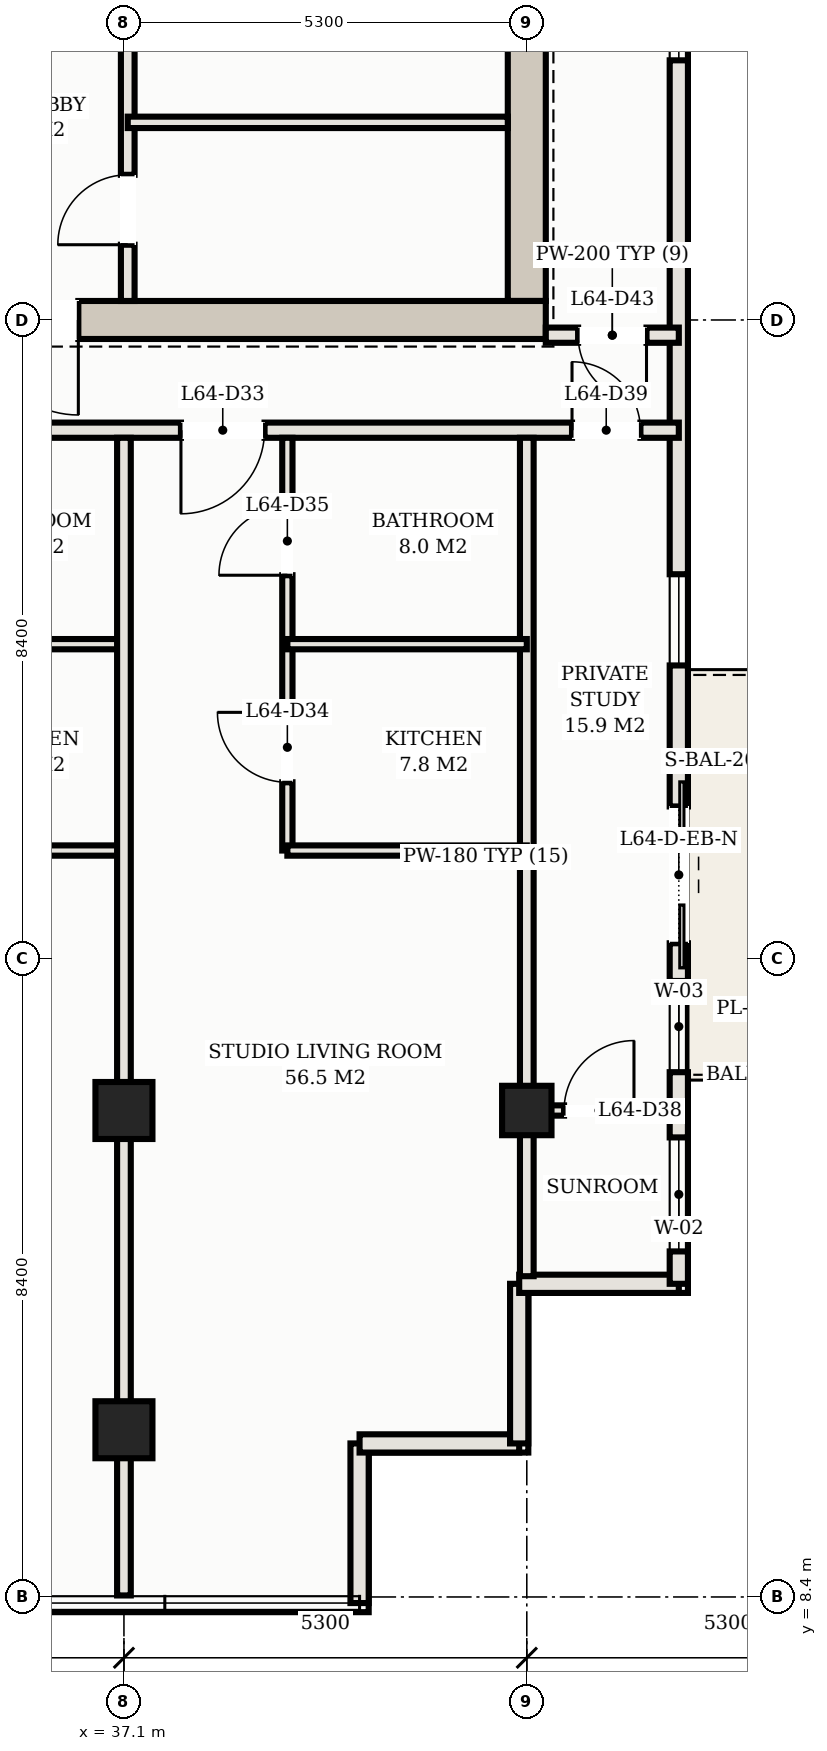
"""IFC4 building model, lengths in metres.
Left out: names, types, materials, properties, quantities, classifications, styles, units other than length and angle.
Written with IfcOpenShell. Run it as: python <this file> out.ifc"""

import sys

from ifc_helpers import new_model, si_unit, direction, frame, frame_2d, origin, origin_2d, place, context, subcontext, project, spatial, rectangle, hollow_rectangle, extrude, element, fill, save


model = new_model("IFC4")
c1 = context("Model", 3, precision=1e-05, world=origin(), true_north=direction((0.0, 1.0)))
c2 = subcontext(c1, "Body", "Model", "MODEL_VIEW")
j1 = project(units=[si_unit("LENGTHUNIT", "METRE"), si_unit("PLANEANGLEUNIT", "RADIAN")], contexts=[c1])
p1 = place(None, origin())
s1 = spatial("IfcSite", under=j1, at=p1, CompositionType="ELEMENT")
p2 = place(p1, origin())
s2 = spatial("IfcBuilding", under=s1, at=p2, CompositionType="ELEMENT")
p3 = place(p2, frame((0.0, 0.0, 233.0)))
s3 = spatial("IfcBuildingStorey", under=s2, at=p3, CompositionType="ELEMENT", Elevation=233.0)
p4 = place(p3, frame((42.4, 25.45, 0.0), z_axis=(0.0, 0.0, 1.0), x_axis=(0.0, 1.0, 0.0)))
e1 = element("IfcWall", 1, at=p4, inside=s3, PredefinedType="SHEAR", context=c2, shape_type="SweptSolid", body=[
    extrude(rectangle(XDim=14.3, YDim=0.5, at=frame_2d((7.15, 0.0))), origin(), (0.0, 0.0, 1.0), 3.11),
])
p5 = place(p3, frame((34.6, 25.2, 0.0), z_axis=(0.0, 0.0, 1.0), x_axis=(1.0, 0.0, 0.0)))
e2 = element("IfcWall", 2, at=p5, inside=s3, PredefinedType="SHEAR", context=c2, shape_type="SweptSolid", body=[
    extrude(rectangle(XDim=8.05, YDim=0.5, at=frame_2d((4.025, 0.0))), origin(), (0.0, 0.0, 1.0), 3.11),
])
p6 = place(p5, frame((0.65, 0.0, 0.0)))
e3 = element("IfcOpeningElement", 3, at=p6, cuts=e2, PredefinedType="OPENING", context=c2, shape_type="SweptSolid", body=[
    extrude(rectangle(XDim=1.25, YDim=2.2, at=frame_2d((0.625, 1.1))), frame((0.0, 0.26, 0.0), z_axis=(0.0, -1.0, 0.0), x_axis=(1.0, 0.0, 0.0)), (0.0, 0.0, 1.0), 0.52),
])
for number, where, z_axis, x_axis in (
    (4, (37.1, 14.8, 0.0), (0.0, 0.0, 1.0), (1.0, 0.0, 0.0)),
    (5, (37.1, 10.6, 0.0), (0.0, 0.0, 1.0), (1.0, 0.0, 0.0)),
):
    element("IfcColumn", number, at=place(p3, frame(where, z_axis=z_axis, x_axis=x_axis)), inside=s3, PredefinedType="COLUMN", context=c2, shape_type="SweptSolid", body=[
        extrude(hollow_rectangle(XDim=0.75, YDim=0.75, WallThickness=0.025, at=origin_2d()), origin(), (0.0, 0.0, 1.0), 3.3),
    ])
p7 = place(p3, frame((42.4, 14.8, 0.0), z_axis=(0.0, 0.0, 1.0), x_axis=(1.0, 0.0, 0.0)))
e6 = element("IfcColumn", 6, at=p7, inside=s3, PredefinedType="COLUMN", context=c2, shape_type="SweptSolid", body=[
    extrude(hollow_rectangle(XDim=0.65, YDim=0.65, WallThickness=0.022, at=origin_2d()), origin(), (0.0, 0.0, 1.0), 3.3),
])
p8 = place(p3, frame((40.2, 8.32, 0.0), z_axis=(0.0, 0.0, 1.0), x_axis=(0.0, 1.0, 0.0)))
e7 = element("IfcWall", 7, at=p8, inside=s3, PredefinedType="SOLIDWALL", context=c2, shape_type="SweptSolid", body=[
    extrude(rectangle(XDim=2.1, YDim=0.24, at=frame_2d((1.05, 0.0))), origin(), (0.0, 0.0, 1.0), 3.11),
])
for number, where, z_axis, x_axis in (
    (8, (40.2, 10.42, 0.0), (0.0, 0.0, 1.0), (1.0, 0.0, 0.0)),
    (9, (42.3, 10.42, 0.0), (0.0, 0.0, 1.0), (0.0, 1.0, 0.0)),
):
    element("IfcWall", number, at=place(p3, frame(where, z_axis=z_axis, x_axis=x_axis)), inside=s3, PredefinedType="SOLIDWALL", context=c2, shape_type="SweptSolid", body=[
        extrude(rectangle(XDim=2.1, YDim=0.24, at=frame_2d((1.05, 0.0))), origin(), (0.0, 0.0, 1.0), 3.11),
    ])
p9 = place(p3, frame((42.3, 12.52, 0.0), z_axis=(0.0, 0.0, 1.0), x_axis=(1.0, 0.0, 0.0)))
e10 = element("IfcWall", 10, at=p9, inside=s3, PredefinedType="SOLIDWALL", context=c2, shape_type="SweptSolid", body=[
    extrude(rectangle(XDim=2.1, YDim=0.24, at=frame_2d((1.05, 0.0))), origin(), (0.0, 0.0, 1.0), 3.11),
])
p10 = place(p3, frame((44.4, 12.52, 0.0), z_axis=(0.0, 0.0, 1.0), x_axis=(0.0, 1.0, 0.0)))
e11 = element("IfcWall", 11, at=p10, inside=s3, PredefinedType="SOLIDWALL", context=c2, shape_type="SweptSolid", body=[
    extrude(rectangle(XDim=26.01, YDim=0.24, at=frame_2d((13.005, 0.0))), origin(), (0.0, 0.0, 1.0), 3.11),
])
p11 = place(p10, frame((4.48, 0.0, 0.0)))
e12 = element("IfcOpeningElement", 12, at=p11, cuts=e11, PredefinedType="OPENING", context=c2, shape_type="SweptSolid", body=[
    extrude(rectangle(XDim=1.8, YDim=2.2, at=frame_2d((0.9, 1.1))), frame((0.0, 0.13, 0.0), z_axis=(0.0, -1.0, 0.0), x_axis=(1.0, 0.0, 0.0)), (0.0, 0.0, 1.0), 0.26),
])
p12 = place(p10, frame((0.426, 0.0, 0.75)))
e13 = element("IfcOpeningElement", 13, at=p12, cuts=e11, PredefinedType="OPENING", context=c2, shape_type="SweptSolid", body=[
    extrude(rectangle(XDim=1.5, YDim=1.6, at=frame_2d((0.75, 0.8))), frame((0.0, 0.13, 0.0), z_axis=(0.0, -1.0, 0.0), x_axis=(1.0, 0.0, 0.0)), (0.0, 0.0, 1.0), 0.26),
])
p13 = place(p10, frame((2.784, 0.0, 0.75)))
e14 = element("IfcOpeningElement", 14, at=p13, cuts=e11, PredefinedType="OPENING", context=c2, shape_type="SweptSolid", body=[
    extrude(rectangle(XDim=1.2, YDim=1.5, at=frame_2d((0.6, 0.75))), frame((0.0, 0.13, 0.0), z_axis=(0.0, -1.0, 0.0), x_axis=(1.0, 0.0, 0.0)), (0.0, 0.0, 1.0), 0.26),
])
p14 = place(p10, frame((8.135, 0.0, 0.75)))
e15 = element("IfcOpeningElement", 15, at=p14, cuts=e11, PredefinedType="OPENING", context=c2, shape_type="SweptSolid", body=[
    extrude(rectangle(XDim=1.2, YDim=1.5, at=frame_2d((0.6, 0.75))), frame((0.0, 0.13, 0.0), z_axis=(0.0, -1.0, 0.0), x_axis=(1.0, 0.0, 0.0)), (0.0, 0.0, 1.0), 0.26),
])
p15 = place(p10, frame((16.096, 0.0, 0.75)))
e16 = element("IfcOpeningElement", 16, at=p15, cuts=e11, PredefinedType="OPENING", context=c2, shape_type="SweptSolid", body=[
    extrude(rectangle(XDim=1.2, YDim=1.5, at=frame_2d((0.6, 0.75))), frame((0.0, 0.13, 0.0), z_axis=(0.0, -1.0, 0.0), x_axis=(1.0, 0.0, 0.0)), (0.0, 0.0, 1.0), 0.26),
])
p16 = place(p10, frame((22.809, 0.0, 0.75)))
e17 = element("IfcOpeningElement", 17, at=p16, cuts=e11, PredefinedType="OPENING", context=c2, shape_type="SweptSolid", body=[
    extrude(rectangle(XDim=1.2, YDim=1.5, at=frame_2d((0.6, 0.75))), frame((0.0, 0.13, 0.0), z_axis=(0.0, -1.0, 0.0), x_axis=(1.0, 0.0, 0.0)), (0.0, 0.0, 1.0), 0.26),
])
p17 = place(p3, frame((37.15, 25.45, 0.0), z_axis=(0.0, 0.0, 1.0), x_axis=(0.0, 1.0, 0.0)))
e18 = element("IfcWall", 18, at=p17, inside=s3, PredefinedType="PARTITIONING", context=c2, shape_type="SweptSolid", body=[
    extrude(rectangle(XDim=5.475, YDim=0.18, at=frame_2d((2.738, 0.0))), origin(), (0.0, 0.0, 1.0), 2.45),
])
p18 = place(p17, frame((0.74, 0.0, 0.0)))
e19 = element("IfcOpeningElement", 19, at=p18, cuts=e18, PredefinedType="OPENING", context=c2, shape_type="SweptSolid", body=[
    extrude(rectangle(XDim=0.92, YDim=2.15, at=frame_2d((0.46, 1.075))), frame((0.0, 0.1, 0.0), z_axis=(0.0, -1.0, 0.0), x_axis=(1.0, 0.0, 0.0)), (0.0, 0.0, 1.0), 0.2),
])
p19 = place(p17, frame((3.427, 0.0, 0.0)))
e20 = element("IfcOpeningElement", 20, at=p19, cuts=e18, PredefinedType="OPENING", context=c2, shape_type="SweptSolid", body=[
    extrude(rectangle(XDim=0.92, YDim=2.15, at=frame_2d((0.46, 1.075))), frame((0.0, 0.1, 0.0), z_axis=(0.0, -1.0, 0.0), x_axis=(1.0, 0.0, 0.0)), (0.0, 0.0, 1.0), 0.2),
])
p20 = place(p3, frame((37.15, 27.8, 0.0), z_axis=(0.0, 0.0, 1.0), x_axis=(1.0, 0.0, 0.0)))
e21 = element("IfcWall", 21, at=p20, inside=s3, PredefinedType="PARTITIONING", context=c2, shape_type="SweptSolid", body=[
    extrude(rectangle(XDim=5.0, YDim=0.15, at=frame_2d((2.5, 0.0))), origin(), (0.0, 0.0, 1.0), 2.45),
])
p21 = place(p3, frame((8.6, 23.75, 0.0), z_axis=(0.0, 0.0, 1.0), x_axis=(1.0, 0.0, 0.0)))
e22 = element("IfcWall", 22, at=p21, inside=s3, PredefinedType="PARTITIONING", context=c2, shape_type="SweptSolid", body=[
    extrude(rectangle(XDim=35.8, YDim=0.2, at=frame_2d((17.9, 0.0))), origin(), (0.0, 0.0, 1.0), 2.45),
])
p22 = place(p21, frame((2.75, 0.0, 0.0)))
e23 = element("IfcOpeningElement", 23, at=p22, cuts=e22, PredefinedType="OPENING", context=c2, shape_type="SweptSolid", body=[
    extrude(rectangle(XDim=1.1, YDim=2.25, at=frame_2d((0.55, 1.125))), frame((0.0, 0.11, 0.0), z_axis=(0.0, -1.0, 0.0), x_axis=(1.0, 0.0, 0.0)), (0.0, 0.0, 1.0), 0.22),
])
p23 = place(p21, frame((8.05, 0.0, 0.0)))
e24 = element("IfcOpeningElement", 24, at=p23, cuts=e22, PredefinedType="OPENING", context=c2, shape_type="SweptSolid", body=[
    extrude(rectangle(XDim=1.1, YDim=2.25, at=frame_2d((0.55, 1.125))), frame((0.0, 0.11, 0.0), z_axis=(0.0, -1.0, 0.0), x_axis=(1.0, 0.0, 0.0)), (0.0, 0.0, 1.0), 0.22),
])
p24 = place(p21, frame((13.35, 0.0, 0.0)))
e25 = element("IfcOpeningElement", 25, at=p24, cuts=e22, PredefinedType="OPENING", context=c2, shape_type="SweptSolid", body=[
    extrude(rectangle(XDim=1.1, YDim=2.25, at=frame_2d((0.55, 1.125))), frame((0.0, 0.11, 0.0), z_axis=(0.0, -1.0, 0.0), x_axis=(1.0, 0.0, 0.0)), (0.0, 0.0, 1.0), 0.22),
])
p25 = place(p21, frame((18.85, 0.0, 0.0)))
e26 = element("IfcOpeningElement", 26, at=p25, cuts=e22, PredefinedType="OPENING", context=c2, shape_type="SweptSolid", body=[
    extrude(rectangle(XDim=1.1, YDim=2.25, at=frame_2d((0.55, 1.125))), frame((0.0, 0.11, 0.0), z_axis=(0.0, -1.0, 0.0), x_axis=(1.0, 0.0, 0.0)), (0.0, 0.0, 1.0), 0.22),
])
p26 = place(p21, frame((23.95, 0.0, 0.0)))
e27 = element("IfcOpeningElement", 27, at=p26, cuts=e22, PredefinedType="OPENING", context=c2, shape_type="SweptSolid", body=[
    extrude(rectangle(XDim=1.1, YDim=2.25, at=frame_2d((0.55, 1.125))), frame((0.0, 0.11, 0.0), z_axis=(0.0, -1.0, 0.0), x_axis=(1.0, 0.0, 0.0)), (0.0, 0.0, 1.0), 0.22),
])
p27 = place(p21, frame((29.25, 0.0, 0.0)))
e28 = element("IfcOpeningElement", 28, at=p27, cuts=e22, PredefinedType="OPENING", context=c2, shape_type="SweptSolid", body=[
    extrude(rectangle(XDim=1.1, YDim=2.25, at=frame_2d((0.55, 1.125))), frame((0.0, 0.11, 0.0), z_axis=(0.0, -1.0, 0.0), x_axis=(1.0, 0.0, 0.0)), (0.0, 0.0, 1.0), 0.22),
])
p28 = place(p21, frame((0.505, 0.0, 0.0)))
e29 = element("IfcOpeningElement", 29, at=p28, cuts=e22, PredefinedType="OPENING", context=c2, shape_type="SweptSolid", body=[
    extrude(rectangle(XDim=0.9, YDim=2.15, at=frame_2d((0.45, 1.075))), frame((0.0, 0.11, 0.0), z_axis=(0.0, -1.0, 0.0), x_axis=(1.0, 0.0, 0.0)), (0.0, 0.0, 1.0), 0.22),
])
p29 = place(p21, frame((34.395, 0.0, 0.0)))
e30 = element("IfcOpeningElement", 30, at=p29, cuts=e22, PredefinedType="OPENING", context=c2, shape_type="SweptSolid", body=[
    extrude(rectangle(XDim=0.9, YDim=2.15, at=frame_2d((0.45, 1.075))), frame((0.0, 0.11, 0.0), z_axis=(0.0, -1.0, 0.0), x_axis=(1.0, 0.0, 0.0)), (0.0, 0.0, 1.0), 0.22),
])
p30 = place(p3, frame((42.65, 25.0, 0.0), z_axis=(0.0, 0.0, 1.0), x_axis=(1.0, 0.0, 0.0)))
e31 = element("IfcWall", 31, at=p30, inside=s3, PredefinedType="PARTITIONING", context=c2, shape_type="SweptSolid", body=[
    extrude(rectangle(XDim=1.75, YDim=0.2, at=frame_2d((0.875, 0.0))), origin(), (0.0, 0.0, 1.0), 2.45),
])
p31 = place(p30, frame((0.425, 0.0, 0.0)))
e32 = element("IfcOpeningElement", 32, at=p31, cuts=e31, PredefinedType="OPENING", context=c2, shape_type="SweptSolid", body=[
    extrude(rectangle(XDim=0.9, YDim=2.15, at=frame_2d((0.45, 1.075))), frame((0.0, 0.11, 0.0), z_axis=(0.0, -1.0, 0.0), x_axis=(1.0, 0.0, 0.0)), (0.0, 0.0, 1.0), 0.22),
])
p32 = place(p3, frame((42.4, 12.62, 0.0), z_axis=(0.0, 0.0, 1.0), x_axis=(0.0, 1.0, 0.0)))
e33 = element("IfcWall", 33, at=p32, inside=s3, PredefinedType="PARTITIONING", context=c2, shape_type="SweptSolid", body=[
    extrude(rectangle(XDim=11.03, YDim=0.18, at=frame_2d((5.515, 0.0))), origin(), (0.0, 0.0, 1.0), 2.45),
])
for number, where, z_axis, x_axis in (
    (34, (33.95, 18.22, 0.0), (0.0, 0.0, 1.0), (1.0, 0.0, 0.0)),
    (35, (33.95, 20.935, 0.0), (0.0, 0.0, 1.0), (1.0, 0.0, 0.0)),
):
    element("IfcWall", number, at=place(p3, frame(where, z_axis=z_axis, x_axis=x_axis)), inside=s3, PredefinedType="PARTITIONING", context=c2, shape_type="SweptSolid", body=[
        extrude(rectangle(XDim=3.15, YDim=0.135, at=frame_2d((1.575, 0.0))), origin(), (0.0, 0.0, 1.0), 2.45),
    ])
p33 = place(p3, frame((37.1, 8.42, 0.0), z_axis=(0.0, 0.0, 1.0), x_axis=(0.0, 1.0, 0.0)))
e36 = element("IfcWall", 36, at=p33, inside=s3, PredefinedType="PARTITIONING", context=c2, shape_type="SweptSolid", body=[
    extrude(rectangle(XDim=15.23, YDim=0.18, at=frame_2d((7.615, 0.0))), origin(), (0.0, 0.0, 1.0), 2.45),
])
p34 = place(p3, frame((39.25, 18.22, 0.0), z_axis=(0.0, 0.0, 1.0), x_axis=(0.0, 1.0, 0.0)))
e37 = element("IfcWall", 37, at=p34, inside=s3, PredefinedType="PARTITIONING", context=c2, shape_type="SweptSolid", body=[
    extrude(rectangle(XDim=5.43, YDim=0.135, at=frame_2d((2.715, 0.0))), origin(), (0.0, 0.0, 1.0), 2.45),
])
p35 = place(p34, frame((0.898, 0.0, 0.0)))
e38 = element("IfcOpeningElement", 38, at=p35, cuts=e37, PredefinedType="OPENING", context=c2, shape_type="SweptSolid", body=[
    extrude(rectangle(XDim=0.92, YDim=2.15, at=frame_2d((0.46, 1.075))), frame((0.0, 0.078, 0.0), z_axis=(0.0, -1.0, 0.0), x_axis=(1.0, 0.0, 0.0)), (0.0, 0.0, 1.0), 0.155),
])
p36 = place(p34, frame((3.622, 0.0, 0.0)))
e39 = element("IfcOpeningElement", 39, at=p36, cuts=e37, PredefinedType="OPENING", context=c2, shape_type="SweptSolid", body=[
    extrude(rectangle(XDim=0.9, YDim=2.15, at=frame_2d((0.45, 1.075))), frame((0.0, 0.078, 0.0), z_axis=(0.0, -1.0, 0.0), x_axis=(1.0, 0.0, 0.0)), (0.0, 0.0, 1.0), 0.155),
])
for number, where, z_axis, x_axis in (
    (40, (39.25, 18.22, 0.0), (0.0, 0.0, 1.0), (1.0, 0.0, 0.0)),
    (41, (39.25, 20.935, 0.0), (0.0, 0.0, 1.0), (1.0, 0.0, 0.0)),
):
    element("IfcWall", number, at=place(p3, frame(where, z_axis=z_axis, x_axis=x_axis)), inside=s3, PredefinedType="PARTITIONING", context=c2, shape_type="SweptSolid", body=[
        extrude(rectangle(XDim=3.15, YDim=0.135, at=frame_2d((1.575, 0.0))), origin(), (0.0, 0.0, 1.0), 2.45),
    ])
p37 = place(p3, frame((42.4, 14.8, 0.0), z_axis=(0.0, 0.0, 1.0), x_axis=(1.0, 0.0, 0.0)))
e42 = element("IfcWall", 42, at=p37, inside=s3, PredefinedType="PARTITIONING", context=c2, shape_type="SweptSolid", body=[
    extrude(rectangle(XDim=1.9, YDim=0.135, at=frame_2d((0.95, 0.0))), origin(), (0.0, 0.0, 1.0), 2.45),
])
p38 = place(p37, frame((0.49, 0.0, 0.0)))
e43 = element("IfcOpeningElement", 43, at=p38, cuts=e42, PredefinedType="OPENING", context=c2, shape_type="SweptSolid", body=[
    extrude(rectangle(XDim=0.92, YDim=2.15, at=frame_2d((0.46, 1.075))), frame((0.0, 0.078, 0.0), z_axis=(0.0, -1.0, 0.0), x_axis=(1.0, 0.0, 0.0)), (0.0, 0.0, 1.0), 0.155),
])
p39 = place(p11, frame((1.8, 0.0, 0.0), z_axis=(0.0, 0.0, 1.0), x_axis=(-1.0, 0.0, 0.0)))
e44 = element("IfcDoor", 44, at=p39, inside=s3, OperationType="DOUBLE_DOOR_SLIDING", PredefinedType="DOOR", context=c2, shape_type="SweptSolid", body=[
    extrude(rectangle(XDim=1.8, YDim=2.2, at=frame_2d((0.9, 1.1))), frame((0.0, 0.025, 0.0), z_axis=(0.0, -1.0, 0.0), x_axis=(1.0, 0.0, 0.0)), (0.0, 0.0, 1.0), 0.05),
])
fill(e12, e44)
p40 = place(p12, origin())
e45 = element("IfcWindow", 45, at=p40, inside=s3, PartitioningType="SINGLE_PANEL", PredefinedType="WINDOW", context=c2, shape_type="SweptSolid", body=[
    extrude(rectangle(XDim=1.5, YDim=1.6, at=frame_2d((0.75, 0.8))), frame((0.0, 0.03, 0.0), z_axis=(0.0, -1.0, 0.0), x_axis=(1.0, 0.0, 0.0)), (0.0, 0.0, 1.0), 0.06),
])
fill(e13, e45)
p41 = place(p6, frame((1.25, 0.0, 0.0), z_axis=(0.0, 0.0, 1.0), x_axis=(-1.0, 0.0, 0.0)))
e46 = element("IfcDoor", 46, at=p41, inside=s3, OperationType="SINGLE_SWING_LEFT", PredefinedType="DOOR", context=c2, shape_type="SweptSolid", body=[
    extrude(rectangle(XDim=1.25, YDim=2.2, at=frame_2d((0.625, 1.1))), frame((0.0, 0.025, 0.0), z_axis=(0.0, -1.0, 0.0), x_axis=(1.0, 0.0, 0.0)), (0.0, 0.0, 1.0), 0.05),
])
fill(e3, e46)
p42 = place(p18, origin())
e47 = element("IfcDoor", 47, at=p42, inside=s3, OperationType="SINGLE_SWING_LEFT", PredefinedType="DOOR", context=c2, shape_type="SweptSolid", body=[
    extrude(rectangle(XDim=0.92, YDim=2.15, at=frame_2d((0.46, 1.075))), frame((0.0, 0.025, 0.0), z_axis=(0.0, -1.0, 0.0), x_axis=(1.0, 0.0, 0.0)), (0.0, 0.0, 1.0), 0.05),
])
fill(e19, e47)
p43 = place(p27, frame((1.1, 0.0, 0.0), z_axis=(0.0, 0.0, 1.0), x_axis=(-1.0, 0.0, 0.0)))
e48 = element("IfcDoor", 48, at=p43, inside=s3, OperationType="SINGLE_SWING_RIGHT", PredefinedType="DOOR", context=c2, shape_type="SweptSolid", body=[
    extrude(rectangle(XDim=1.1, YDim=2.25, at=frame_2d((0.55, 1.125))), frame((0.0, 0.025, 0.0), z_axis=(0.0, -1.0, 0.0), x_axis=(1.0, 0.0, 0.0)), (0.0, 0.0, 1.0), 0.05),
])
fill(e28, e48)
p44 = place(p35, origin())
e49 = element("IfcDoor", 49, at=p44, inside=s3, OperationType="SINGLE_SWING_RIGHT", PredefinedType="DOOR", context=c2, shape_type="SweptSolid", body=[
    extrude(rectangle(XDim=0.92, YDim=2.15, at=frame_2d((0.46, 1.075))), frame((0.0, 0.025, 0.0), z_axis=(0.0, -1.0, 0.0), x_axis=(1.0, 0.0, 0.0)), (0.0, 0.0, 1.0), 0.05),
])
fill(e38, e49)
p45 = place(p36, origin())
e50 = element("IfcDoor", 50, at=p45, inside=s3, OperationType="SINGLE_SWING_LEFT", PredefinedType="DOOR", context=c2, shape_type="SweptSolid", body=[
    extrude(rectangle(XDim=0.9, YDim=2.15, at=frame_2d((0.45, 1.075))), frame((0.0, 0.025, 0.0), z_axis=(0.0, -1.0, 0.0), x_axis=(1.0, 0.0, 0.0)), (0.0, 0.0, 1.0), 0.05),
])
fill(e39, e50)
p46 = place(p38, origin())
e51 = element("IfcDoor", 51, at=p46, inside=s3, OperationType="SINGLE_SWING_RIGHT", PredefinedType="DOOR", context=c2, shape_type="SweptSolid", body=[
    extrude(rectangle(XDim=0.92, YDim=2.15, at=frame_2d((0.46, 1.075))), frame((0.0, 0.025, 0.0), z_axis=(0.0, -1.0, 0.0), x_axis=(1.0, 0.0, 0.0)), (0.0, 0.0, 1.0), 0.05),
])
fill(e43, e51)
p47 = place(p29, origin())
e52 = element("IfcDoor", 52, at=p47, inside=s3, OperationType="SINGLE_SWING_LEFT", PredefinedType="DOOR", context=c2, shape_type="SweptSolid", body=[
    extrude(rectangle(XDim=0.9, YDim=2.15, at=frame_2d((0.45, 1.075))), frame((0.0, 0.025, 0.0), z_axis=(0.0, -1.0, 0.0), x_axis=(1.0, 0.0, 0.0)), (0.0, 0.0, 1.0), 0.05),
])
fill(e30, e52)
p48 = place(p31, frame((0.9, 0.0, 0.0), z_axis=(0.0, 0.0, 1.0), x_axis=(-1.0, 0.0, 0.0)))
e53 = element("IfcDoor", 53, at=p48, inside=s3, OperationType="SINGLE_SWING_LEFT", PredefinedType="DOOR", context=c2, shape_type="SweptSolid", body=[
    extrude(rectangle(XDim=0.9, YDim=2.15, at=frame_2d((0.45, 1.075))), frame((0.0, 0.025, 0.0), z_axis=(0.0, -1.0, 0.0), x_axis=(1.0, 0.0, 0.0)), (0.0, 0.0, 1.0), 0.05),
])
fill(e32, e53)
p49 = place(p13, origin())
e54 = element("IfcWindow", 54, at=p49, inside=s3, PartitioningType="SINGLE_PANEL", PredefinedType="WINDOW", context=c2, shape_type="SweptSolid", body=[
    extrude(rectangle(XDim=1.2, YDim=1.5, at=frame_2d((0.6, 0.75))), frame((0.0, 0.03, 0.0), z_axis=(0.0, -1.0, 0.0), x_axis=(1.0, 0.0, 0.0)), (0.0, 0.0, 1.0), 0.06),
])
fill(e14, e54)
p50 = place(p14, origin())
e55 = element("IfcWindow", 55, at=p50, inside=s3, PartitioningType="SINGLE_PANEL", PredefinedType="WINDOW", context=c2, shape_type="SweptSolid", body=[
    extrude(rectangle(XDim=1.2, YDim=1.5, at=frame_2d((0.6, 0.75))), frame((0.0, 0.03, 0.0), z_axis=(0.0, -1.0, 0.0), x_axis=(1.0, 0.0, 0.0)), (0.0, 0.0, 1.0), 0.06),
])
fill(e15, e55)
p51 = place(p15, origin())
e56 = element("IfcWindow", 56, at=p51, inside=s3, PartitioningType="SINGLE_PANEL", PredefinedType="WINDOW", context=c2, shape_type="SweptSolid", body=[
    extrude(rectangle(XDim=1.2, YDim=1.5, at=frame_2d((0.6, 0.75))), frame((0.0, 0.03, 0.0), z_axis=(0.0, -1.0, 0.0), x_axis=(1.0, 0.0, 0.0)), (0.0, 0.0, 1.0), 0.06),
])
fill(e16, e56)
save(model, sys.argv[1])
